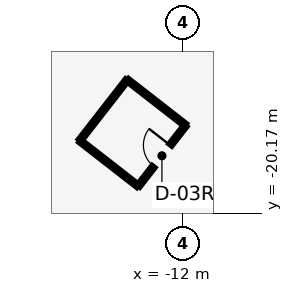
"""IFC4 building model, lengths in metres.
Left out: names, types, materials, properties, quantities, classifications, styles, units other than length and angle.
Written with IfcOpenShell. Run it as: python <this file> out.ifc"""

import sys

from ifc_helpers import new_model, si_unit, direction, frame, frame_2d, origin, place, context, subcontext, project, spatial, rectangle, extrude, element, fill, save


model = new_model("IFC4")
c1 = context("Model", 3, precision=1e-05, world=origin(), true_north=direction((0.0, 1.0)))
c2 = subcontext(c1, "Body", "Model", "MODEL_VIEW")
j1 = project(units=[si_unit("LENGTHUNIT", "METRE"), si_unit("PLANEANGLEUNIT", "RADIAN")], contexts=[c1])
p1 = place(None, origin())
s1 = spatial("IfcSite", under=j1, at=p1, CompositionType="ELEMENT")
p2 = place(p1, origin())
s2 = spatial("IfcBuilding", under=s1, at=p2, CompositionType="ELEMENT")
p3 = place(p2, frame((0.0, 0.0, 218.8)))
s3 = spatial("IfcBuildingStorey", under=s2, at=p3, CompositionType="ELEMENT", Elevation=218.8)
p4 = place(p3, frame((-13.841, -15.771, 0.0), z_axis=(0.0, 0.0, 1.0), x_axis=(-0.614253348711, -0.789108879431, 0.0)))
e1 = element("IfcWall", 1, at=p4, inside=s3, PredefinedType="PARTITIONING", context=c2, shape_type="SweptSolid", body=[
    extrude(rectangle(XDim=2.54, YDim=0.14, at=frame_2d((1.27, 0.0))), origin(), (0.0, 0.0, 1.0), 3.85),
])
p5 = place(p3, frame((-15.401, -17.775, 0.0), z_axis=(0.0, 0.0, 1.0), x_axis=(0.789039633333, -0.614342296305, 0.0)))
e2 = element("IfcWall", 2, at=p5, inside=s3, PredefinedType="PARTITIONING", context=c2, shape_type="SweptSolid", body=[
    extrude(rectangle(XDim=2.44, YDim=0.14, at=frame_2d((1.22, 0.0))), origin(), (0.0, 0.0, 1.0), 3.85),
])
p6 = place(p3, frame((-13.476, -19.274, 0.0), z_axis=(0.0, 0.0, 1.0), x_axis=(0.614266610483, 0.789098556104, 0.0)))
e3 = element("IfcWall", 3, at=p6, inside=s3, PredefinedType="PARTITIONING", context=c2, shape_type="SweptSolid", body=[
    extrude(rectangle(XDim=2.54, YDim=0.14, at=frame_2d((1.27, 0.0))), origin(), (0.0, 0.0, 1.0), 3.85),
])
p7 = place(p6, frame((0.83, 0.0, 0.0)))
e4 = element("IfcOpeningElement", 4, at=p7, cuts=e3, PredefinedType="OPENING", context=c2, shape_type="SweptSolid", body=[
    extrude(rectangle(XDim=0.88, YDim=2.1, at=frame_2d((0.44, 1.05))), frame((0.0, 0.08, 0.0), z_axis=(0.0, -1.0, 0.0), x_axis=(1.0, 0.0, 0.0)), (0.0, 0.0, 1.0), 0.16),
])
p8 = place(p3, frame((-11.915, -17.27, 0.0), z_axis=(0.0, 0.0, 1.0), x_axis=(-0.789125887798, 0.614231498059, 0.0)))
e5 = element("IfcWall", 5, at=p8, inside=s3, PredefinedType="PARTITIONING", context=c2, shape_type="SweptSolid", body=[
    extrude(rectangle(XDim=2.44, YDim=0.14, at=frame_2d((1.22, 0.0))), origin(), (0.0, 0.0, 1.0), 3.85),
])
p9 = place(p7, origin())
e6 = element("IfcDoor", 6, at=p9, inside=s3, OperationType="SINGLE_SWING_RIGHT", PredefinedType="DOOR", context=c2, shape_type="SweptSolid", body=[
    extrude(rectangle(XDim=0.88, YDim=2.1, at=frame_2d((0.44, 1.05))), frame((0.0, 0.025, 0.0), z_axis=(0.0, -1.0, 0.0), x_axis=(1.0, 0.0, 0.0)), (0.0, 0.0, 1.0), 0.05),
])
fill(e4, e6)
save(model, sys.argv[1])
